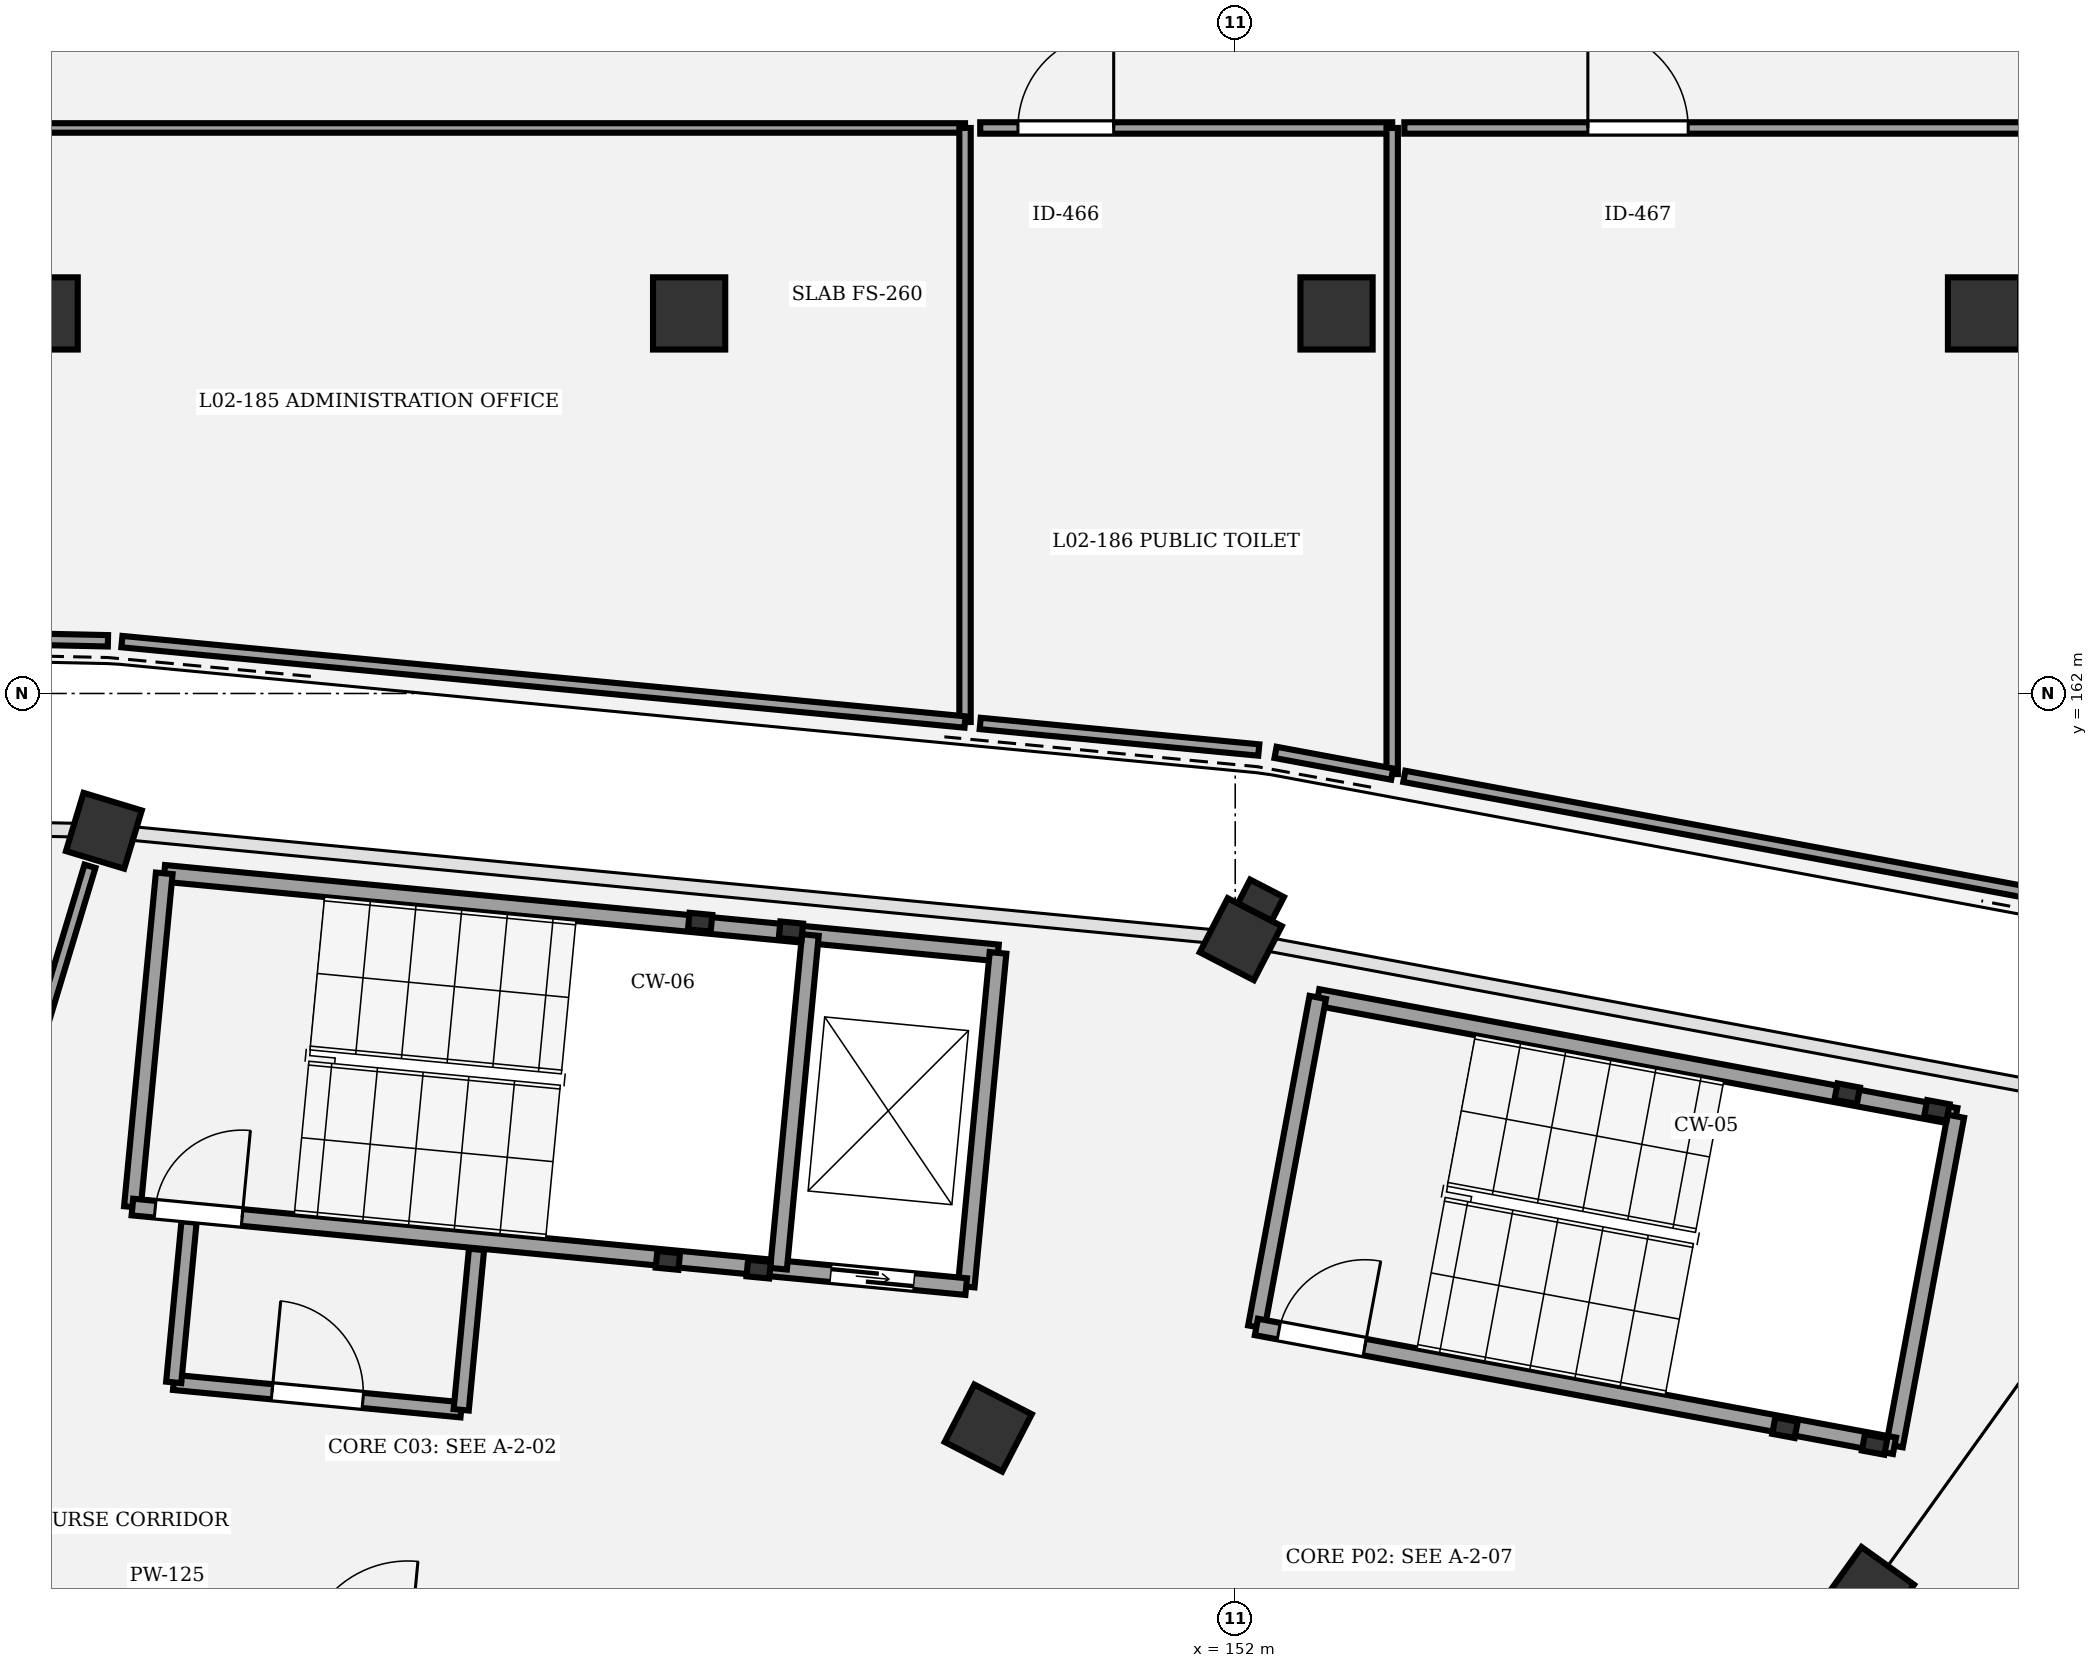
"""IFC4 building model, lengths in metres.
Left out: names, types, materials, properties, quantities, classifications, styles, units other than length and angle.
Written with IfcOpenShell. Run it as: python <this file> out.ifc"""

import sys

from ifc_helpers import new_model, si_unit, direction, frame, frame_2d, origin, origin_2d, place, context, subcontext, project, spatial, rectangle, circle, extrude, element, fill, save


model = new_model("IFC4")
c1 = context("Model", 3, precision=1e-05, world=origin(), true_north=direction((0.0, 1.0)))
c2 = subcontext(c1, "Body", "Model", "MODEL_VIEW")
j1 = project(units=[si_unit("LENGTHUNIT", "METRE"), si_unit("PLANEANGLEUNIT", "RADIAN")], contexts=[c1])
p1 = place(None, origin())
s1 = spatial("IfcSite", under=j1, at=p1, CompositionType="ELEMENT")
p2 = place(p1, origin())
s2 = spatial("IfcBuilding", under=s1, at=p2, CompositionType="ELEMENT")
p3 = place(p2, frame((0.0, 0.0, 10.2)))
s3 = spatial("IfcBuildingStorey", under=s2, at=p3, CompositionType="ELEMENT", Elevation=10.2)
for number, where, z_axis, x_axis in (
    (1, (160.338, 150.177, 0.0), (0.0, 0.0, 1.0), (0.583, 0.812, 0.0)),
    (2, (148.75, 152.335, 0.0), (0.0, 0.0, 1.0), (0.459, 0.888, 0.0)),
):
    element("IfcColumn", number, at=place(p3, frame(where, z_axis=z_axis, x_axis=x_axis)), inside=s3, PredefinedType="COLUMN", context=c2, shape_type="SweptSolid", body=[
        extrude(rectangle(XDim=0.85, YDim=0.85, at=origin_2d()), origin(), (0.0, 0.0, 1.0), 4.5),
    ])
p4 = place(p3, frame((152.073, 158.767, 0.0), z_axis=(0.0, 0.0, 1.0), x_axis=(0.458959712465, 0.888457079624, 0.0)))
e3 = element("IfcColumn", 3, at=p4, inside=s3, PredefinedType="COLUMN", context=c2, shape_type="SweptSolid", body=[
    extrude(rectangle(XDim=0.8, YDim=0.8, at=origin_2d()), origin(), (0.0, 0.0, 1.0), 4.5),
])
p5 = place(p3, frame((152.338, 159.281, 0.0), z_axis=(0.0, 0.0, 1.0), x_axis=(-0.888457079624, 0.458959712465, 0.0)))
e4 = element("IfcColumn", 4, at=p5, inside=s3, PredefinedType="PILASTER", context=c2, shape_type="SweptSolid", body=[
    extrude(rectangle(XDim=0.5, YDim=0.35, at=origin_2d()), origin(), (0.0, 0.0, 1.0), 4.5),
])
p6 = place(p3, frame((137.115, 160.194, 0.0), z_axis=(0.0, 0.0, 1.0), x_axis=(0.289198876314, 0.957269037387, 0.0)))
e5 = element("IfcColumn", 5, at=p6, inside=s3, PredefinedType="COLUMN", context=c2, shape_type="SweptSolid", body=[
    extrude(rectangle(XDim=0.8, YDim=0.8, at=origin_2d()), origin(), (0.0, 0.0, 1.0), 4.5),
])
for number, where, z_axis, x_axis in (
    (6, (136.296, 167.0, 0.0), (0.0, 0.0, 1.0), (1.0, 0.0, 0.0)),
    (7, (144.815, 167.0, 0.0), (0.0, 0.0, 1.0), (1.0, 0.0, 0.0)),
    (8, (153.333, 167.0, 0.0), (0.0, 0.0, 1.0), (1.0, 0.0, 0.0)),
    (9, (161.852, 167.0, 0.0), (0.0, 0.0, 1.0), (1.0, 0.0, 0.0)),
):
    element("IfcColumn", number, at=place(p3, frame(where, z_axis=z_axis, x_axis=x_axis)), inside=s3, PredefinedType="COLUMN", context=c2, shape_type="SweptSolid", body=[
        extrude(circle(Radius=0.475, at=origin_2d()), origin(), (0.0, 0.0, 1.0), 4.5),
    ])
for number, where, z_axis, x_axis in (
    (10, (144.535, 154.541, 0.0), (0.0, 0.0, 1.0), (0.995, -0.095, 0.0)),
    (11, (145.73, 154.427, 0.0), (0.0, 0.0, 1.0), (0.995, -0.095, 0.0)),
    (12, (146.154, 158.877, 0.0), (0.0, 0.0, 1.0), (0.995, -0.095, 0.0)),
    (13, (144.96, 158.991, 0.0), (0.0, 0.0, 1.0), (0.995, -0.095, 0.0)),
):
    element("IfcColumn", number, at=place(p3, frame(where, z_axis=z_axis, x_axis=x_axis)), inside=s3, PredefinedType="COLUMN", context=c2, shape_type="SweptSolid", body=[
        extrude(rectangle(XDim=0.3, YDim=0.22, at=origin_2d()), origin(), (0.0, 0.0, 1.0), 4.5),
    ])
p7 = place(p3, frame((137.909, 159.634, 0.0), z_axis=(0.0, 0.0, 1.0), x_axis=(0.99547962713, -0.094975322952, 0.0)))
e14 = element("IfcWall", 14, at=p7, inside=s3, PredefinedType="SHEAR", context=c2, shape_type="SweptSolid", body=[
    extrude(rectangle(XDim=11.02, YDim=0.22, at=frame_2d((5.51, 0.0))), origin(), (0.0, 0.0, 1.0), 4.25),
])
p8 = place(p3, frame((137.49, 155.243, 0.0), z_axis=(0.0, 0.0, 1.0), x_axis=(0.094997189401, 0.995477540684, 0.0)))
e15 = element("IfcWall", 15, at=p8, inside=s3, PredefinedType="SHEAR", context=c2, shape_type="SweptSolid", body=[
    extrude(rectangle(XDim=4.41, YDim=0.22, at=frame_2d((2.205, 0.0))), origin(), (0.0, 0.0, 1.0), 4.25),
])
p9 = place(p3, frame((148.46, 154.197, 0.0), z_axis=(0.0, 0.0, 1.0), x_axis=(0.095002424918, 0.995477041051, 0.0)))
e16 = element("IfcWall", 16, at=p9, inside=s3, PredefinedType="SHEAR", context=c2, shape_type="SweptSolid", body=[
    extrude(rectangle(XDim=4.41, YDim=0.22, at=frame_2d((2.205, 0.0))), origin(), (0.0, 0.0, 1.0), 4.25),
])
p10 = place(p3, frame((137.49, 155.243, 0.0), z_axis=(0.0, 0.0, 1.0), x_axis=(0.995481721489, -0.094953368458, 0.0)))
e17 = element("IfcWall", 17, at=p10, inside=s3, PredefinedType="SHEAR", context=c2, shape_type="SweptSolid", body=[
    extrude(rectangle(XDim=11.02, YDim=0.22, at=frame_2d((5.51, 0.0))), origin(), (0.0, 0.0, 1.0), 4.25),
])
p11 = place(p10, frame((0.3, 0.0, 0.0)))
e18 = element("IfcOpeningElement", 18, at=p11, cuts=e17, PredefinedType="OPENING", context=c2, shape_type="SweptSolid", body=[
    extrude(rectangle(XDim=1.15, YDim=2.15, at=frame_2d((0.575, 1.075))), frame((0.0, 0.12, 0.0), z_axis=(0.0, -1.0, 0.0), x_axis=(1.0, 0.0, 0.0)), (0.0, 0.0, 1.0), 0.24),
])
p12 = place(p10, frame((9.23, 0.0, 0.0)))
e19 = element("IfcOpeningElement", 19, at=p12, cuts=e17, PredefinedType="OPENING", context=c2, shape_type="SweptSolid", body=[
    extrude(rectangle(XDim=1.1, YDim=2.15, at=frame_2d((0.55, 1.075))), frame((0.0, 0.12, 0.0), z_axis=(0.0, -1.0, 0.0), x_axis=(1.0, 0.0, 0.0)), (0.0, 0.0, 1.0), 0.24),
])
p13 = place(p3, frame((145.991, 154.432, 0.0), z_axis=(0.0, 0.0, 1.0), x_axis=(0.094997189401, 0.995477540684, 0.0)))
e20 = element("IfcWall", 20, at=p13, inside=s3, PredefinedType="SHEAR", context=c2, shape_type="SweptSolid", body=[
    extrude(rectangle(XDim=4.41, YDim=0.22, at=frame_2d((2.205, 0.0))), origin(), (0.0, 0.0, 1.0), 4.25),
])
p14 = place(p3, frame((138.033, 152.937, 0.0), z_axis=(0.0, 0.0, 1.0), x_axis=(0.995481022971, -0.094960691361, 0.0)))
e21 = element("IfcWall", 21, at=p14, inside=s3, PredefinedType="PARTITIONING", context=c2, shape_type="SweptSolid", body=[
    extrude(rectangle(XDim=3.8, YDim=0.2, at=frame_2d((1.9, 0.0))), origin(), (0.0, 0.0, 1.0), 3.35),
])
p15 = place(p14, frame((1.3, 0.0, 0.0)))
e22 = element("IfcOpeningElement", 22, at=p15, cuts=e21, PredefinedType="OPENING", context=c2, shape_type="SweptSolid", body=[
    extrude(rectangle(XDim=1.2, YDim=2.18, at=frame_2d((0.6, 1.09))), frame((0.0, 0.11, 0.0), z_axis=(0.0, -1.0, 0.0), x_axis=(1.0, 0.0, 0.0)), (0.0, 0.0, 1.0), 0.22),
])
for number, where, z_axis, x_axis in (
    (23, (138.033, 152.937, 0.0), (0.0, 0.0, 1.0), (0.095, 0.995, 0.0)),
    (24, (141.816, 152.576, 0.0), (0.0, 0.0, 1.0), (0.095, 0.995, 0.0)),
):
    element("IfcWall", number, at=place(p3, frame(where, z_axis=z_axis, x_axis=x_axis)), inside=s3, PredefinedType="PARTITIONING", context=c2, shape_type="SweptSolid", body=[
        extrude(rectangle(XDim=2.12, YDim=0.2, at=frame_2d((1.06, 0.0))), origin(), (0.0, 0.0, 1.0), 3.35),
    ])
for number, where, z_axis, x_axis in (
    (25, (159.233, 152.34, 0.0), (0.0, 0.0, 1.0), (0.983, -0.183, 0.0)),
    (26, (160.413, 152.121, 0.0), (0.0, 0.0, 1.0), (0.983, -0.183, 0.0)),
    (27, (161.231, 156.515, 0.0), (0.0, 0.0, 1.0), (0.983, -0.183, 0.0)),
    (28, (160.052, 156.735, 0.0), (0.0, 0.0, 1.0), (0.983, -0.183, 0.0)),
):
    element("IfcColumn", number, at=place(p3, frame(where, z_axis=z_axis, x_axis=x_axis)), inside=s3, PredefinedType="COLUMN", context=c2, shape_type="SweptSolid", body=[
        extrude(rectangle(XDim=0.3, YDim=0.22, at=origin_2d()), origin(), (0.0, 0.0, 1.0), 4.5),
    ])
p16 = place(p3, frame((153.086, 158.001, 0.0), z_axis=(0.0, 0.0, 1.0), x_axis=(0.983097993869, -0.18308013123, 0.0)))
e29 = element("IfcWall", 29, at=p16, inside=s3, PredefinedType="SHEAR", context=c2, shape_type="SweptSolid", body=[
    extrude(rectangle(XDim=8.54, YDim=0.22, at=frame_2d((4.27, 0.0))), origin(), (0.0, 0.0, 1.0), 4.25),
])
for number, where, z_axis, x_axis in (
    (30, (152.279, 153.666, 0.0), (0.0, 0.0, 1.0), (0.183, 0.983, 0.0)),
    (31, (160.674, 152.103, 0.0), (0.0, 0.0, 1.0), (0.183, 0.983, 0.0)),
):
    element("IfcWall", number, at=place(p3, frame(where, z_axis=z_axis, x_axis=x_axis)), inside=s3, PredefinedType="SHEAR", context=c2, shape_type="SweptSolid", body=[
        extrude(rectangle(XDim=4.41, YDim=0.22, at=frame_2d((2.205, 0.0))), origin(), (0.0, 0.0, 1.0), 4.25),
    ])
p17 = place(p3, frame((152.279, 153.666, 0.0), z_axis=(0.0, 0.0, 1.0), x_axis=(0.983097993869, -0.18308013123, 0.0)))
e32 = element("IfcWall", 32, at=p17, inside=s3, PredefinedType="SHEAR", context=c2, shape_type="SweptSolid", body=[
    extrude(rectangle(XDim=8.54, YDim=0.22, at=frame_2d((4.27, 0.0))), origin(), (0.0, 0.0, 1.0), 4.25),
])
p18 = place(p17, frame((0.3, 0.0, 0.0)))
e33 = element("IfcOpeningElement", 33, at=p18, cuts=e32, PredefinedType="OPENING", context=c2, shape_type="SweptSolid", body=[
    extrude(rectangle(XDim=1.15, YDim=2.15, at=frame_2d((0.575, 1.075))), frame((0.0, 0.12, 0.0), z_axis=(0.0, -1.0, 0.0), x_axis=(1.0, 0.0, 0.0)), (0.0, 0.0, 1.0), 0.24),
])
p19 = place(p3, frame((123.5, 169.44, 0.0), z_axis=(0.0, 0.0, 1.0), x_axis=(1.0, 0.0, 0.0)))
e34 = element("IfcWall", 34, at=p19, inside=s3, PredefinedType="PARTITIONING", context=c2, shape_type="SweptSolid", body=[
    extrude(rectangle(XDim=24.945, YDim=0.125, at=frame_2d((12.473, 0.0))), origin(), (0.0, 0.0, 1.0), 3.25),
])
p20 = place(p19, frame((8.4, 0.0, 0.0)))
e35 = element("IfcOpeningElement", 35, at=p20, cuts=e34, PredefinedType="OPENING", context=c2, shape_type="SweptSolid", body=[
    extrude(rectangle(XDim=1.22, YDim=2.3, at=frame_2d((0.61, 1.15))), frame((0.0, 0.073, 0.0), z_axis=(0.0, -1.0, 0.0), x_axis=(1.0, 0.0, 0.0)), (0.0, 0.0, 1.0), 0.145),
])
p21 = place(p3, frame((148.645, 169.44, 0.0), z_axis=(0.0, 0.0, 1.0), x_axis=(1.0, 0.0, 0.0)))
e36 = element("IfcWall", 36, at=p21, inside=s3, PredefinedType="PARTITIONING", context=c2, shape_type="SweptSolid", body=[
    extrude(rectangle(XDim=5.42, YDim=0.15, at=frame_2d((2.71, 0.0))), origin(), (0.0, 0.0, 1.0), 3.25),
])
p22 = place(p21, frame((0.496, 0.0, 0.0)))
e37 = element("IfcOpeningElement", 37, at=p22, cuts=e36, PredefinedType="OPENING", context=c2, shape_type="SweptSolid", body=[
    extrude(rectangle(XDim=1.26, YDim=2.3, at=frame_2d((0.63, 1.15))), frame((0.0, 0.085, 0.0), z_axis=(0.0, -1.0, 0.0), x_axis=(1.0, 0.0, 0.0)), (0.0, 0.0, 1.0), 0.17),
])
p23 = place(p3, frame((154.225, 169.44, 0.0), z_axis=(0.0, 0.0, 1.0), x_axis=(1.0, 0.0, 0.0)))
e38 = element("IfcWall", 38, at=p23, inside=s3, PredefinedType="PARTITIONING", context=c2, shape_type="SweptSolid", body=[
    extrude(rectangle(XDim=19.415, YDim=0.15, at=frame_2d((9.708, 0.0))), origin(), (0.0, 0.0, 1.0), 3.25),
])
p24 = place(p23, frame((2.415, 0.0, 0.0)))
e39 = element("IfcOpeningElement", 39, at=p24, cuts=e38, PredefinedType="OPENING", context=c2, shape_type="SweptSolid", body=[
    extrude(rectangle(XDim=1.32, YDim=2.3, at=frame_2d((0.66, 1.15))), frame((0.0, 0.085, 0.0), z_axis=(0.0, -1.0, 0.0), x_axis=(1.0, 0.0, 0.0)), (0.0, 0.0, 1.0), 0.17),
])
p25 = place(p3, frame((136.932, 159.727, 0.0), z_axis=(0.0, 0.0, 1.0), x_axis=(-0.289195444178, -0.957270074256, 0.0)))
e40 = element("IfcWall", 40, at=p25, inside=s3, PredefinedType="PARTITIONING", context=c2, shape_type="SweptSolid", body=[
    extrude(rectangle(XDim=5.817, YDim=0.15, at=frame_2d((2.909, 0.0))), origin(), (0.0, 0.0, 1.0), 3.25),
])
p26 = place(p3, frame((137.168, 162.693, 0.0), z_axis=(0.0, 0.0, 1.0), x_axis=(-0.999768230535, 0.021528706714, 0.0)))
e41 = element("IfcWall", 41, at=p26, inside=s3, PredefinedType="PARTITIONING", context=c2, shape_type="SweptSolid", body=[
    extrude(rectangle(XDim=13.722, YDim=0.15, at=frame_2d((6.861, 0.0))), origin(), (0.0, 0.0, 1.0), 3.25),
])
p27 = place(p3, frame((148.445, 169.44, 0.0), z_axis=(0.0, 0.0, 1.0), x_axis=(0.0, -1.0, 0.0)))
e42 = element("IfcWall", 42, at=p27, inside=s3, PredefinedType="PARTITIONING", context=c2, shape_type="SweptSolid", body=[
    extrude(rectangle(XDim=7.815, YDim=0.15, at=frame_2d((3.908, 0.0))), origin(), (0.0, 0.0, 1.0), 3.25),
])
p28 = place(p3, frame((148.445, 161.625, 0.0), z_axis=(0.0, 0.0, 1.0), x_axis=(-0.995483944756, 0.094930057059, 0.0)))
e43 = element("IfcWall", 43, at=p28, inside=s3, PredefinedType="PARTITIONING", context=c2, shape_type="SweptSolid", body=[
    extrude(rectangle(XDim=11.144, YDim=0.15, at=frame_2d((5.572, 0.0))), origin(), (0.0, 0.0, 1.0), 3.25),
])
p29 = place(p3, frame((152.31, 161.256, 0.0), z_axis=(0.0, 0.0, 1.0), x_axis=(-0.995481155674, 0.094959300221, 0.0)))
e44 = element("IfcWall", 44, at=p29, inside=s3, PredefinedType="PARTITIONING", context=c2, shape_type="SweptSolid", body=[
    extrude(rectangle(XDim=3.682, YDim=0.15, at=frame_2d((1.841, 0.0))), origin(), (0.0, 0.0, 1.0), 3.25),
])
p30 = place(p3, frame((154.065, 169.44, 0.0), z_axis=(0.0, 0.0, 1.0), x_axis=(0.0, -1.0, 0.0)))
e45 = element("IfcWall", 45, at=p30, inside=s3, PredefinedType="PARTITIONING", context=c2, shape_type="SweptSolid", body=[
    extrude(rectangle(XDim=8.5, YDim=0.15, at=frame_2d((4.25, 0.0))), origin(), (0.0, 0.0, 1.0), 3.25),
])
p31 = place(p3, frame((154.065, 160.939, 0.0), z_axis=(0.0, 0.0, 1.0), x_axis=(-0.983110419565, 0.183013395528, 0.0)))
e46 = element("IfcWall", 46, at=p31, inside=s3, PredefinedType="PARTITIONING", context=c2, shape_type="SweptSolid", body=[
    extrude(rectangle(XDim=1.561, YDim=0.15, at=frame_2d((0.78, 0.0))), origin(), (0.0, 0.0, 1.0), 3.25),
])
p32 = place(p3, frame((165.259, 158.854, 0.0), z_axis=(0.0, 0.0, 1.0), x_axis=(-0.983091639371, 0.183114250127, 0.0)))
e47 = element("IfcWall", 47, at=p32, inside=s3, PredefinedType="PARTITIONING", context=c2, shape_type="SweptSolid", body=[
    extrude(rectangle(XDim=11.223, YDim=0.15, at=frame_2d((5.612, 0.0))), origin(), (0.0, 0.0, 1.0), 3.25),
])
p33 = place(p11, origin())
e48 = element("IfcDoor", 48, at=p33, inside=s3, OperationType="SINGLE_SWING_RIGHT", PredefinedType="DOOR", context=c2, shape_type="SweptSolid", body=[
    extrude(rectangle(XDim=1.15, YDim=2.15, at=frame_2d((0.575, 1.075))), frame((0.0, 0.025, 0.0), z_axis=(0.0, -1.0, 0.0), x_axis=(1.0, 0.0, 0.0)), (0.0, 0.0, 1.0), 0.05),
])
fill(e18, e48)
p34 = place(p12, origin())
e49 = element("IfcDoor", 49, at=p34, inside=s3, OperationType="DOUBLE_DOOR_SLIDING", PredefinedType="DOOR", context=c2, shape_type="SweptSolid", body=[
    extrude(rectangle(XDim=1.1, YDim=2.15, at=frame_2d((0.55, 1.075))), frame((0.0, 0.025, 0.0), z_axis=(0.0, -1.0, 0.0), x_axis=(1.0, 0.0, 0.0)), (0.0, 0.0, 1.0), 0.05),
])
fill(e19, e49)
p35 = place(p15, origin())
e50 = element("IfcDoor", 50, at=p35, inside=s3, OperationType="SINGLE_SWING_LEFT", PredefinedType="DOOR", context=c2, shape_type="SweptSolid", body=[
    extrude(rectangle(XDim=1.2, YDim=2.18, at=frame_2d((0.6, 1.09))), frame((0.0, 0.025, 0.0), z_axis=(0.0, -1.0, 0.0), x_axis=(1.0, 0.0, 0.0)), (0.0, 0.0, 1.0), 0.05),
])
fill(e22, e50)
p36 = place(p18, origin())
e51 = element("IfcDoor", 51, at=p36, inside=s3, OperationType="SINGLE_SWING_RIGHT", PredefinedType="DOOR", context=c2, shape_type="SweptSolid", body=[
    extrude(rectangle(XDim=1.15, YDim=2.15, at=frame_2d((0.575, 1.075))), frame((0.0, 0.025, 0.0), z_axis=(0.0, -1.0, 0.0), x_axis=(1.0, 0.0, 0.0)), (0.0, 0.0, 1.0), 0.05),
])
fill(e33, e51)
p37 = place(p22, origin())
e52 = element("IfcDoor", 52, at=p37, inside=s3, OperationType="SINGLE_SWING_RIGHT", PredefinedType="DOOR", context=c2, shape_type="SweptSolid", body=[
    extrude(rectangle(XDim=1.26, YDim=2.3, at=frame_2d((0.63, 1.15))), frame((0.0, 0.025, 0.0), z_axis=(0.0, -1.0, 0.0), x_axis=(1.0, 0.0, 0.0)), (0.0, 0.0, 1.0), 0.05),
])
fill(e37, e52)
p38 = place(p24, origin())
e53 = element("IfcDoor", 53, at=p38, inside=s3, OperationType="SINGLE_SWING_LEFT", PredefinedType="DOOR", context=c2, shape_type="SweptSolid", body=[
    extrude(rectangle(XDim=1.32, YDim=2.3, at=frame_2d((0.66, 1.15))), frame((0.0, 0.025, 0.0), z_axis=(0.0, -1.0, 0.0), x_axis=(1.0, 0.0, 0.0)), (0.0, 0.0, 1.0), 0.05),
])
fill(e39, e53)
save(model, sys.argv[1])
